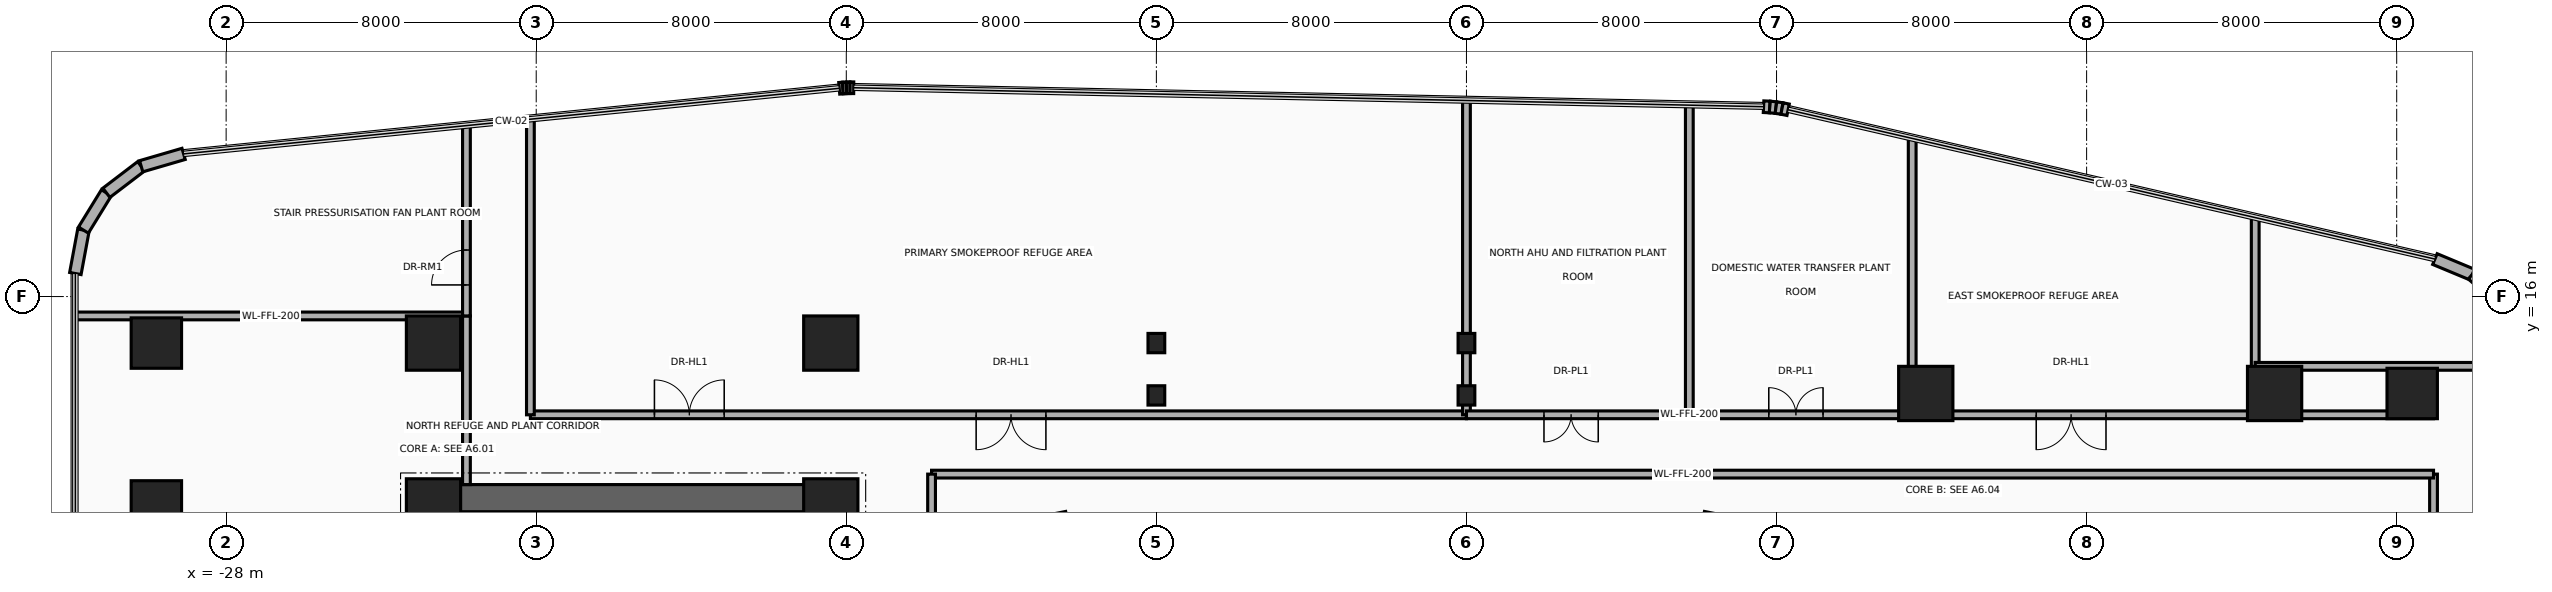
"""IFC4 building model, lengths in metres.
Left out: names, types, materials, properties, quantities, classifications, styles, units other than length and angle.
Written with IfcOpenShell. Run it as: python <this file> out.ifc"""

import sys

from ifc_helpers import new_model, si_unit, direction, frame, frame_2d, origin, origin_2d, place, context, subcontext, project, spatial, rectangle, circle, i_section, extrude, source, transform, mapped, element, fill, save


model = new_model("IFC4")
c1 = context("Model", 3, precision=1e-05, world=origin(), true_north=direction((0.0, 1.0)))
c2 = subcontext(c1, "Body", "Model", "MODEL_VIEW")
j1 = project(units=[si_unit("LENGTHUNIT", "METRE"), si_unit("PLANEANGLEUNIT", "RADIAN")], contexts=[c1])
p1 = place(None, origin())
s1 = spatial("IfcSite", under=j1, at=p1, CompositionType="ELEMENT")
p2 = place(p1, origin())
s2 = spatial("IfcBuilding", under=s1, at=p2, CompositionType="ELEMENT")
p3 = place(p2, frame((0.0, 0.0, 96.3)))
s3 = spatial("IfcBuildingStorey", under=s2, at=p3, CompositionType="ELEMENT", Elevation=96.3)
for number, where, z_axis, x_axis in (
    (1, (-22.16, 1.78, 0.0), (0.0, 0.0, 1.0), (0.0, 1.0, 0.0)),
    (2, (-18.83, 1.78, 0.0), (0.0, 0.0, 1.0), (0.0, 1.0, 0.0)),
):
    element("IfcWall", number, at=place(p3, frame(where, z_axis=z_axis, x_axis=x_axis)), inside=s3, PredefinedType="SHEAR", context=c2, shape_type="SweptSolid", body=[
        extrude(rectangle(XDim=8.67, YDim=0.22, at=frame_2d((4.335, 0.0))), origin(), (0.0, 0.0, 1.0), 4.56),
    ])
p4 = place(p3, frame((-22.65, -11.15, 0.0), z_axis=(0.0, 0.0, 1.0), x_axis=(0.0, 1.0, 0.0)))
e3 = element("IfcWall", 3, at=p4, inside=s3, PredefinedType="SHEAR", context=c2, shape_type="SweptSolid", body=[
    extrude(rectangle(XDim=22.3, YDim=0.7, at=frame_2d((11.15, 0.0))), origin(), (0.0, 0.0, 1.0), 4.56),
])
p5 = place(p3, frame((-22.65, 10.8, 0.0), z_axis=(0.0, 0.0, 1.0), x_axis=(1.0, 0.0, 0.0)))
e4 = element("IfcWall", 4, at=p5, inside=s3, PredefinedType="SHEAR", context=c2, shape_type="SweptSolid", body=[
    extrude(rectangle(XDim=10.25, YDim=0.7, at=frame_2d((5.125, 0.0))), origin(), (0.0, 0.0, 1.0), 4.56),
])
m1 = source(origin(), c2, "Body", "SweptSolid", [
    extrude(circle(Radius=0.65, at=origin_2d()), origin(), (0.0, 0.0, 1.0), 4.8),
])
p6 = place(p3, frame((-29.8, 10.6, 0.0), z_axis=(0.0, 0.0, 1.0), x_axis=(1.0, 0.0, 0.0)))
e5 = element("IfcColumn", 5, at=p6, inside=s3, PredefinedType="COLUMN", context=c2, shape_type="MappedRepresentation", body=[
    mapped(m1, transform((0.0, 0.0, 0.0), x_axis=(1.0, 0.0, 0.0), y_axis=(0.0, 1.0, 0.0), z_axis=(0.0, 0.0, 1.0), scale=1.0)),
])
m2 = source(origin(), c2, "Body", "SweptSolid", [
    extrude(rectangle(XDim=1.4, YDim=1.4, at=origin_2d()), origin(), (0.0, 0.0, 1.0), 4.8),
])
for number, where, z_axis, x_axis in (
    (6, (-22.65, 10.6, 0.0), (0.0, 0.0, 1.0), (1.0, 0.0, 0.0)),
    (7, (-12.4, 10.6, 0.0), (0.0, 0.0, 1.0), (1.0, 0.0, 0.0)),
):
    element("IfcColumn", number, at=place(p3, frame(where, z_axis=z_axis, x_axis=x_axis)), inside=s3, PredefinedType="COLUMN", context=c2, shape_type="MappedRepresentation", body=[
        mapped(m2, transform((0.0, 0.0, 0.0), x_axis=(1.0, 0.0, 0.0), y_axis=(0.0, 1.0, 0.0), z_axis=(0.0, 0.0, 1.0), scale=1.0)),
    ])
p7 = place(p3, frame((-29.8, 14.8, 0.0), z_axis=(0.0, 0.0, 1.0), x_axis=(1.0, 0.0, 0.0)))
e8 = element("IfcColumn", 8, at=p7, inside=s3, PredefinedType="COLUMN", context=c2, shape_type="MappedRepresentation", body=[
    mapped(m1, transform((0.0, 0.0, 0.0), x_axis=(1.0, 0.0, 0.0), y_axis=(0.0, 1.0, 0.0), z_axis=(0.0, 0.0, 1.0), scale=1.0)),
])
for number, where, z_axis, x_axis in (
    (9, (-22.65, 14.8, 0.0), (0.0, 0.0, 1.0), (1.0, 0.0, 0.0)),
    (10, (-12.4, 14.8, 0.0), (0.0, 0.0, 1.0), (1.0, 0.0, 0.0)),
    (11, (15.85, 13.5, 0.0), (0.0, 0.0, 1.0), (1.0, 0.0, 0.0)),
    (12, (24.85, 13.5, 0.0), (0.0, 0.0, 1.0), (1.0, 0.0, 0.0)),
):
    element("IfcColumn", number, at=place(p3, frame(where, z_axis=z_axis, x_axis=x_axis)), inside=s3, PredefinedType="COLUMN", context=c2, shape_type="MappedRepresentation", body=[
        mapped(m2, transform((0.0, 0.0, 0.0), x_axis=(1.0, 0.0, 0.0), y_axis=(0.0, 1.0, 0.0), z_axis=(0.0, 0.0, 1.0), scale=1.0)),
    ])
p8 = place(p3, frame((28.4, 13.5, 0.0), z_axis=(0.0, 0.0, 1.0), x_axis=(1.0, 0.0, 0.0)))
e13 = element("IfcColumn", 13, at=p8, inside=s3, PredefinedType="COLUMN", context=c2, shape_type="MappedRepresentation", body=[
    mapped(m1, transform((0.0, 0.0, 0.0), x_axis=(1.0, 0.0, 0.0), y_axis=(0.0, 1.0, 0.0), z_axis=(0.0, 0.0, 1.0), scale=1.0)),
])
m3 = source(origin(), c2, "Body", "SweptSolid", [
    extrude(i_section(OverallWidth=0.432, OverallDepth=0.498, WebThickness=0.056, FlangeThickness=0.089, at=origin_2d()), origin(), (0.0, 0.0, 1.0), 4.8),
])
for number, where, z_axis, x_axis in (
    (14, (-4.0, 13.45, 0.0), (0.0, 0.0, 1.0), (1.0, 0.0, 0.0)),
    (15, (-4.0, 14.8, 0.0), (0.0, 0.0, 1.0), (1.0, 0.0, 0.0)),
    (16, (4.0, 13.45, 0.0), (0.0, 0.0, 1.0), (1.0, 0.0, 0.0)),
    (17, (4.0, 14.8, 0.0), (0.0, 0.0, 1.0), (1.0, 0.0, 0.0)),
):
    element("IfcColumn", number, at=place(p3, frame(where, z_axis=z_axis, x_axis=x_axis)), inside=s3, PredefinedType="COLUMN", context=c2, shape_type="MappedRepresentation", body=[
        mapped(m3, transform((0.0, 0.0, 0.0), x_axis=(1.0, 0.0, 0.0), y_axis=(0.0, 1.0, 0.0), z_axis=(0.0, 0.0, 1.0), scale=1.0)),
    ])
p9 = place(p3, frame((-31.89, 16.594, 0.0), z_axis=(0.0, 0.0, 1.0), x_axis=(0.182748995683, 0.9831596028, 0.0)))
e18 = element("IfcWall", 18, at=p9, inside=s3, PredefinedType="SOLIDWALL", context=c2, shape_type="SweptSolid", body=[
    extrude(rectangle(XDim=1.14, YDim=0.3, at=frame_2d((0.57, 0.0))), origin(), (0.0, 0.0, 1.0), 4.56),
])
p10 = place(p3, frame((-31.682, 17.714, 0.0), z_axis=(0.0, 0.0, 1.0), x_axis=(0.524157723014, 0.8516212077, 0.0)))
e19 = element("IfcWall", 19, at=p10, inside=s3, PredefinedType="SOLIDWALL", context=c2, shape_type="SweptSolid", body=[
    extrude(rectangle(XDim=1.129, YDim=0.3, at=frame_2d((0.565, 0.0))), origin(), (0.0, 0.0, 1.0), 4.56),
])
p11 = place(p3, frame((-31.09, 18.676, 0.0), z_axis=(0.0, 0.0, 1.0), x_axis=(0.795253002434, 0.606277710393, 0.0)))
e20 = element("IfcWall", 20, at=p11, inside=s3, PredefinedType="SOLIDWALL", context=c2, shape_type="SweptSolid", body=[
    extrude(rectangle(XDim=1.129, YDim=0.3, at=frame_2d((0.564, 0.0))), origin(), (0.0, 0.0, 1.0), 4.56),
])
p12 = place(p3, frame((-30.192, 19.361, 0.0), z_axis=(0.0, 0.0, 1.0), x_axis=(0.960071941549, 0.279753225271, 0.0)))
e21 = element("IfcWall", 21, at=p12, inside=s3, PredefinedType="SOLIDWALL", context=c2, shape_type="SweptSolid", body=[
    extrude(rectangle(XDim=1.14, YDim=0.3, at=frame_2d((0.57, 0.0))), origin(), (0.0, 0.0, 1.0), 4.56),
])
p13 = place(p3, frame((-12.182, 21.371, 0.0), z_axis=(0.0, 0.0, 1.0), x_axis=(0.996527790842, 0.08326080759, 0.0)))
e22 = element("IfcWall", 22, at=p13, inside=s3, PredefinedType="SOLIDWALL", context=c2, shape_type="SweptSolid", body=[
    extrude(rectangle(XDim=0.094, YDim=0.3, at=frame_2d((0.047, 0.0))), origin(), (0.0, 0.0, 1.0), 4.56),
])
p14 = place(p3, frame((-12.088, 21.379, 0.0), z_axis=(0.0, 0.0, 1.0), x_axis=(0.998476480444, 0.055178963393, 0.0)))
e23 = element("IfcWall", 23, at=p14, inside=s3, PredefinedType="SOLIDWALL", context=c2, shape_type="SweptSolid", body=[
    extrude(rectangle(XDim=0.093, YDim=0.3, at=frame_2d((0.046, 0.0))), origin(), (0.0, 0.0, 1.0), 4.56),
])
p15 = place(p3, frame((-11.996, 21.384, 0.0), z_axis=(0.0, 0.0, 1.0), x_axis=(0.999722573757, 0.023553673204, 0.0)))
e24 = element("IfcWall", 24, at=p15, inside=s3, PredefinedType="SOLIDWALL", context=c2, shape_type="SweptSolid", body=[
    extrude(rectangle(XDim=0.093, YDim=0.3, at=frame_2d((0.047, 0.0))), origin(), (0.0, 0.0, 1.0), 4.56),
])
p16 = place(p3, frame((-11.902, 21.386, 0.0), z_axis=(0.0, 0.0, 1.0), x_axis=(0.999986507273, -0.005194735103, 0.0)))
e25 = element("IfcWall", 25, at=p16, inside=s3, PredefinedType="SOLIDWALL", context=c2, shape_type="SweptSolid", body=[
    extrude(rectangle(XDim=0.094, YDim=0.3, at=frame_2d((0.047, 0.0))), origin(), (0.0, 0.0, 1.0), 4.56),
])
p17 = place(p3, frame((11.666, 20.897, 0.0), z_axis=(0.0, 0.0, 1.0), x_axis=(0.998885297239, -0.047203421059, 0.0)))
e26 = element("IfcWall", 26, at=p17, inside=s3, PredefinedType="SOLIDWALL", context=c2, shape_type="SweptSolid", body=[
    extrude(rectangle(XDim=0.16, YDim=0.3, at=frame_2d((0.08, 0.0))), origin(), (0.0, 0.0, 1.0), 4.56),
])
p18 = place(p3, frame((11.826, 20.889, 0.0), z_axis=(0.0, 0.0, 1.0), x_axis=(0.995172891136, -0.098137234257, 0.0)))
e27 = element("IfcWall", 27, at=p18, inside=s3, PredefinedType="SOLIDWALL", context=c2, shape_type="SweptSolid", body=[
    extrude(rectangle(XDim=0.159, YDim=0.3, at=frame_2d((0.08, 0.0))), origin(), (0.0, 0.0, 1.0), 4.56),
])
p19 = place(p3, frame((11.984, 20.874, 0.0), z_axis=(0.0, 0.0, 1.0), x_axis=(0.988846069207, -0.148941100486, 0.0)))
e28 = element("IfcWall", 28, at=p19, inside=s3, PredefinedType="SOLIDWALL", context=c2, shape_type="SweptSolid", body=[
    extrude(rectangle(XDim=0.159, YDim=0.3, at=frame_2d((0.08, 0.0))), origin(), (0.0, 0.0, 1.0), 4.56),
])
p20 = place(p3, frame((12.142, 20.85, 0.0), z_axis=(0.0, 0.0, 1.0), x_axis=(0.979991950448, -0.19903712482, 0.0)))
e29 = element("IfcWall", 29, at=p20, inside=s3, PredefinedType="SOLIDWALL", context=c2, shape_type="SweptSolid", body=[
    extrude(rectangle(XDim=0.161, YDim=0.3, at=frame_2d((0.08, 0.0))), origin(), (0.0, 0.0, 1.0), 4.56),
])
p21 = place(p3, frame((28.986, 16.967, 0.0), z_axis=(0.0, 0.0, 1.0), x_axis=(0.923083852684, -0.384598753136, 0.0)))
e30 = element("IfcWall", 30, at=p21, inside=s3, PredefinedType="SOLIDWALL", context=c2, shape_type="SweptSolid", body=[
    extrude(rectangle(XDim=1.042, YDim=0.3, at=frame_2d((0.521, 0.0))), origin(), (0.0, 0.0, 1.0), 4.56),
])
p22 = place(p3, frame((29.948, 16.566, 0.0), z_axis=(0.0, 0.0, 1.0), x_axis=(0.744585645533, -0.66752694063, 0.0)))
e31 = element("IfcWall", 31, at=p22, inside=s3, PredefinedType="SOLIDWALL", context=c2, shape_type="SweptSolid", body=[
    extrude(rectangle(XDim=1.033, YDim=0.3, at=frame_2d((0.517, 0.0))), origin(), (0.0, 0.0, 1.0), 4.56),
])
for number, where, z_axis, x_axis in (
    (32, (11.367, 10.06, 0.0), (0.0, 0.0, 1.0), (-0.981, 0.195, 0.0)),
    (33, (-6.311, 10.31, 0.0), (0.0, 0.0, 1.0), (-0.981, -0.195, 0.0)),
):
    element("IfcWall", number, at=place(p3, frame(where, z_axis=z_axis, x_axis=x_axis)), inside=s3, PredefinedType="SOLIDWALL", context=c2, shape_type="SweptSolid", body=[
        extrude(rectangle(XDim=1.281, YDim=0.3, at=frame_2d((0.641, 0.0))), origin(), (0.0, 0.0, 1.0), 4.56),
    ])
p23 = place(p3, frame((-31.89, 15.5, 0.0), z_axis=(0.0, 0.0, 1.0), x_axis=(1.0, 0.0, 0.0)))
e34 = element("IfcWall", 34, at=p23, inside=s3, PredefinedType="PARTITIONING", context=c2, shape_type="SweptSolid", body=[
    extrude(rectangle(XDim=10.09, YDim=0.2, at=frame_2d((5.045, 0.0))), origin(), (0.0, 0.0, 1.0), 4.56),
])
p24 = place(p3, frame((-21.8, 11.15, 0.0), z_axis=(0.0, 0.0, 1.0), x_axis=(0.0, 1.0, 0.0)))
e35 = element("IfcWall", 35, at=p24, inside=s3, PredefinedType="PARTITIONING", context=c2, shape_type="SweptSolid", body=[
    extrude(rectangle(XDim=4.35, YDim=0.2, at=frame_2d((2.175, 0.0))), origin(), (0.0, 0.0, 1.0), 3.766),
])
p25 = place(p3, frame((-21.8, 15.5, 0.0), z_axis=(0.0, 0.0, 1.0), x_axis=(0.0, 1.0, 0.0)))
e36 = element("IfcWall", 36, at=p25, inside=s3, PredefinedType="PARTITIONING", context=c2, shape_type="SweptSolid", body=[
    extrude(rectangle(XDim=4.909, YDim=0.2, at=frame_2d((2.455, 0.0))), origin(), (0.0, 0.0, 1.0), 4.56),
])
p26 = place(p25, frame((0.8, 0.0, 0.0)))
e37 = element("IfcOpeningElement", 37, at=p26, cuts=e36, PredefinedType="OPENING", context=c2, shape_type="SweptSolid", body=[
    extrude(rectangle(XDim=0.9, YDim=2.1, at=frame_2d((0.45, 1.05))), frame((0.0, 0.115, 0.0), z_axis=(0.0, -1.0, 0.0), x_axis=(1.0, 0.0, 0.0)), (0.0, 0.0, 1.0), 0.23),
])
p27 = place(p3, frame((-20.15, 12.95, 0.0), z_axis=(0.0, 0.0, 1.0), x_axis=(1.0, 0.0, 0.0)))
e38 = element("IfcWall", 38, at=p27, inside=s3, PredefinedType="PARTITIONING", context=c2, shape_type="SweptSolid", body=[
    extrude(rectangle(XDim=24.15, YDim=0.2, at=frame_2d((12.075, 0.0))), origin(), (0.0, 0.0, 1.0), 3.766),
])
p28 = place(p27, frame((3.2, 0.0, 0.0)))
e39 = element("IfcOpeningElement", 39, at=p28, cuts=e38, PredefinedType="OPENING", context=c2, shape_type="SweptSolid", body=[
    extrude(rectangle(XDim=1.8, YDim=2.15, at=frame_2d((0.9, 1.075))), frame((0.0, 0.115, 0.0), z_axis=(0.0, -1.0, 0.0), x_axis=(1.0, 0.0, 0.0)), (0.0, 0.0, 1.0), 0.23),
])
p29 = place(p27, frame((11.5, 0.0, 0.0)))
e40 = element("IfcOpeningElement", 40, at=p29, cuts=e38, PredefinedType="OPENING", context=c2, shape_type="SweptSolid", body=[
    extrude(rectangle(XDim=1.8, YDim=2.15, at=frame_2d((0.9, 1.075))), frame((0.0, 0.115, 0.0), z_axis=(0.0, -1.0, 0.0), x_axis=(1.0, 0.0, 0.0)), (0.0, 0.0, 1.0), 0.23),
])
p30 = place(p3, frame((-20.15, 12.95, 0.0), z_axis=(0.0, 0.0, 1.0), x_axis=(0.0, 1.0, 0.0)))
e41 = element("IfcWall", 41, at=p30, inside=s3, PredefinedType="PARTITIONING", context=c2, shape_type="SweptSolid", body=[
    extrude(rectangle(XDim=7.625, YDim=0.2, at=frame_2d((3.812, 0.0))), origin(), (0.0, 0.0, 1.0), 3.766),
])
p31 = place(p3, frame((4.0, 12.95, 0.0), z_axis=(0.0, 0.0, 1.0), x_axis=(0.0, 1.0, 0.0)))
e42 = element("IfcWall", 42, at=p31, inside=s3, PredefinedType="PARTITIONING", context=c2, shape_type="SweptSolid", body=[
    extrude(rectangle(XDim=8.107, YDim=0.2, at=frame_2d((4.053, 0.0))), origin(), (0.0, 0.0, 1.0), 3.766),
])
p32 = place(p3, frame((4.0, 12.95, 0.0), z_axis=(0.0, 0.0, 1.0), x_axis=(1.0, 0.0, 0.0)))
e43 = element("IfcWall", 43, at=p32, inside=s3, PredefinedType="PARTITIONING", context=c2, shape_type="SweptSolid", body=[
    extrude(rectangle(XDim=11.5, YDim=0.2, at=frame_2d((5.75, 0.0))), origin(), (0.0, 0.0, 1.0), 3.766),
])
p33 = place(p32, frame((2.0, 0.0, 0.0)))
e44 = element("IfcOpeningElement", 44, at=p33, cuts=e43, PredefinedType="OPENING", context=c2, shape_type="SweptSolid", body=[
    extrude(rectangle(XDim=1.4, YDim=2.15, at=frame_2d((0.7, 1.075))), frame((0.0, 0.115, 0.0), z_axis=(0.0, -1.0, 0.0), x_axis=(1.0, 0.0, 0.0)), (0.0, 0.0, 1.0), 0.23),
])
p34 = place(p32, frame((7.8, 0.0, 0.0)))
e45 = element("IfcOpeningElement", 45, at=p34, cuts=e43, PredefinedType="OPENING", context=c2, shape_type="SweptSolid", body=[
    extrude(rectangle(XDim=1.4, YDim=2.15, at=frame_2d((0.7, 1.075))), frame((0.0, 0.115, 0.0), z_axis=(0.0, -1.0, 0.0), x_axis=(1.0, 0.0, 0.0)), (0.0, 0.0, 1.0), 0.23),
])
p35 = place(p3, frame((9.75, 12.95, 0.0), z_axis=(0.0, 0.0, 1.0), x_axis=(0.0, 1.0, 0.0)))
e46 = element("IfcWall", 46, at=p35, inside=s3, PredefinedType="PARTITIONING", context=c2, shape_type="SweptSolid", body=[
    extrude(rectangle(XDim=7.987, YDim=0.2, at=frame_2d((3.994, 0.0))), origin(), (0.0, 0.0, 1.0), 3.766),
])
p36 = place(p3, frame((15.5, 12.95, 0.0), z_axis=(0.0, 0.0, 1.0), x_axis=(1.0, 0.0, 0.0)))
e47 = element("IfcWall", 47, at=p36, inside=s3, PredefinedType="PARTITIONING", context=c2, shape_type="SweptSolid", body=[
    extrude(rectangle(XDim=8.85, YDim=0.2, at=frame_2d((4.425, 0.0))), origin(), (0.0, 0.0, 1.0), 3.934),
])
p37 = place(p36, frame((3.2, 0.0, 0.0)))
e48 = element("IfcOpeningElement", 48, at=p37, cuts=e47, PredefinedType="OPENING", context=c2, shape_type="SweptSolid", body=[
    extrude(rectangle(XDim=1.8, YDim=2.15, at=frame_2d((0.9, 1.075))), frame((0.0, 0.115, 0.0), z_axis=(0.0, -1.0, 0.0), x_axis=(1.0, 0.0, 0.0)), (0.0, 0.0, 1.0), 0.23),
])
p38 = place(p3, frame((15.5, 12.95, 0.0), z_axis=(0.0, 0.0, 1.0), x_axis=(0.0, 1.0, 0.0)))
e49 = element("IfcWall", 49, at=p38, inside=s3, PredefinedType="PARTITIONING", context=c2, shape_type="SweptSolid", body=[
    extrude(rectangle(XDim=7.129, YDim=0.2, at=frame_2d((3.565, 0.0))), origin(), (0.0, 0.0, 1.0), 3.766),
])
p39 = place(p3, frame((24.35, 12.95, 0.0), z_axis=(0.0, 0.0, 1.0), x_axis=(0.0, 1.0, 0.0)))
e50 = element("IfcWall", 50, at=p39, inside=s3, PredefinedType="PARTITIONING", context=c2, shape_type="SweptSolid", body=[
    extrude(rectangle(XDim=5.087, YDim=0.2, at=frame_2d((2.543, 0.0))), origin(), (0.0, 0.0, 1.0), 3.766),
])
p40 = place(p3, frame((28.95, 1.55, 0.0), z_axis=(0.0, 0.0, 1.0), x_axis=(0.0, 1.0, 0.0)))
e51 = element("IfcWall", 51, at=p40, inside=s3, PredefinedType="PARTITIONING", context=c2, shape_type="SweptSolid", body=[
    extrude(rectangle(XDim=9.87, YDim=0.2, at=frame_2d((4.935, 0.0))), origin(), (0.0, 0.0, 1.0), 4.56),
])
p41 = place(p3, frame((24.35, 14.2, 0.0), z_axis=(0.0, 0.0, 1.0), x_axis=(1.0, 0.0, 0.0)))
e52 = element("IfcWall", 52, at=p41, inside=s3, PredefinedType="PARTITIONING", context=c2, shape_type="SweptSolid", body=[
    extrude(rectangle(XDim=6.45, YDim=0.2, at=frame_2d((3.225, 0.0))), origin(), (0.0, 0.0, 1.0), 4.56),
])
p42 = place(p3, frame((24.35, 12.95, 0.0), z_axis=(0.0, 0.0, 1.0), x_axis=(1.0, 0.0, 0.0)))
e53 = element("IfcWall", 53, at=p42, inside=s3, PredefinedType="PARTITIONING", context=c2, shape_type="SweptSolid", body=[
    extrude(rectangle(XDim=4.6, YDim=0.2, at=frame_2d((2.3, 0.0))), origin(), (0.0, 0.0, 1.0), 3.934),
])
p43 = place(p3, frame((-9.8, 11.42, 0.0), z_axis=(0.0, 0.0, 1.0), x_axis=(1.0, 0.0, 0.0)))
e54 = element("IfcWall", 54, at=p43, inside=s3, PredefinedType="PARTITIONING", context=c2, shape_type="SweptSolid", body=[
    extrude(rectangle(XDim=38.75, YDim=0.2, at=frame_2d((19.375, 0.0))), origin(), (0.0, 0.0, 1.0), 3.766),
])
p44 = place(p3, frame((-9.8, -12.9, 0.0), z_axis=(0.0, 0.0, 1.0), x_axis=(0.0, 1.0, 0.0)))
e55 = element("IfcWall", 55, at=p44, inside=s3, PredefinedType="PARTITIONING", context=c2, shape_type="SweptSolid", body=[
    extrude(rectangle(XDim=24.32, YDim=0.2, at=frame_2d((12.16, 0.0))), origin(), (0.0, 0.0, 1.0), 3.766),
])
p45 = place(p26, origin())
e56 = element("IfcDoor", 56, at=p45, inside=s3, OperationType="SINGLE_SWING_LEFT", PredefinedType="DOOR", context=c2, shape_type="SweptSolid", body=[
    extrude(rectangle(XDim=0.9, YDim=2.1, at=frame_2d((0.45, 1.05))), frame((0.0, 0.025, 0.0), z_axis=(0.0, -1.0, 0.0), x_axis=(1.0, 0.0, 0.0)), (0.0, 0.0, 1.0), 0.05),
])
fill(e37, e56)
p46 = place(p28, origin())
e57 = element("IfcDoor", 57, at=p46, inside=s3, OperationType="DOUBLE_DOOR_SINGLE_SWING", PredefinedType="DOOR", context=c2, shape_type="SweptSolid", body=[
    extrude(rectangle(XDim=1.8, YDim=2.15, at=frame_2d((0.9, 1.075))), frame((0.0, 0.025, 0.0), z_axis=(0.0, -1.0, 0.0), x_axis=(1.0, 0.0, 0.0)), (0.0, 0.0, 1.0), 0.05),
])
fill(e39, e57)
p47 = place(p29, frame((1.8, 0.0, 0.0), z_axis=(0.0, 0.0, 1.0), x_axis=(-1.0, 0.0, 0.0)))
e58 = element("IfcDoor", 58, at=p47, inside=s3, OperationType="DOUBLE_DOOR_SINGLE_SWING", PredefinedType="DOOR", context=c2, shape_type="SweptSolid", body=[
    extrude(rectangle(XDim=1.8, YDim=2.15, at=frame_2d((0.9, 1.075))), frame((0.0, 0.025, 0.0), z_axis=(0.0, -1.0, 0.0), x_axis=(1.0, 0.0, 0.0)), (0.0, 0.0, 1.0), 0.05),
])
fill(e40, e58)
p48 = place(p33, frame((1.4, 0.0, 0.0), z_axis=(0.0, 0.0, 1.0), x_axis=(-1.0, 0.0, 0.0)))
e59 = element("IfcDoor", 59, at=p48, inside=s3, OperationType="DOUBLE_DOOR_SINGLE_SWING", PredefinedType="DOOR", context=c2, shape_type="SweptSolid", body=[
    extrude(rectangle(XDim=1.4, YDim=2.15, at=frame_2d((0.7, 1.075))), frame((0.0, 0.025, 0.0), z_axis=(0.0, -1.0, 0.0), x_axis=(1.0, 0.0, 0.0)), (0.0, 0.0, 1.0), 0.05),
])
fill(e44, e59)
p49 = place(p34, origin())
e60 = element("IfcDoor", 60, at=p49, inside=s3, OperationType="DOUBLE_DOOR_SINGLE_SWING", PredefinedType="DOOR", context=c2, shape_type="SweptSolid", body=[
    extrude(rectangle(XDim=1.4, YDim=2.15, at=frame_2d((0.7, 1.075))), frame((0.0, 0.025, 0.0), z_axis=(0.0, -1.0, 0.0), x_axis=(1.0, 0.0, 0.0)), (0.0, 0.0, 1.0), 0.05),
])
fill(e45, e60)
p50 = place(p37, frame((1.8, 0.0, 0.0), z_axis=(0.0, 0.0, 1.0), x_axis=(-1.0, 0.0, 0.0)))
e61 = element("IfcDoor", 61, at=p50, inside=s3, OperationType="DOUBLE_DOOR_SINGLE_SWING", PredefinedType="DOOR", context=c2, shape_type="SweptSolid", body=[
    extrude(rectangle(XDim=1.8, YDim=2.15, at=frame_2d((0.9, 1.075))), frame((0.0, 0.025, 0.0), z_axis=(0.0, -1.0, 0.0), x_axis=(1.0, 0.0, 0.0)), (0.0, 0.0, 1.0), 0.05),
])
fill(e48, e61)
save(model, sys.argv[1])
